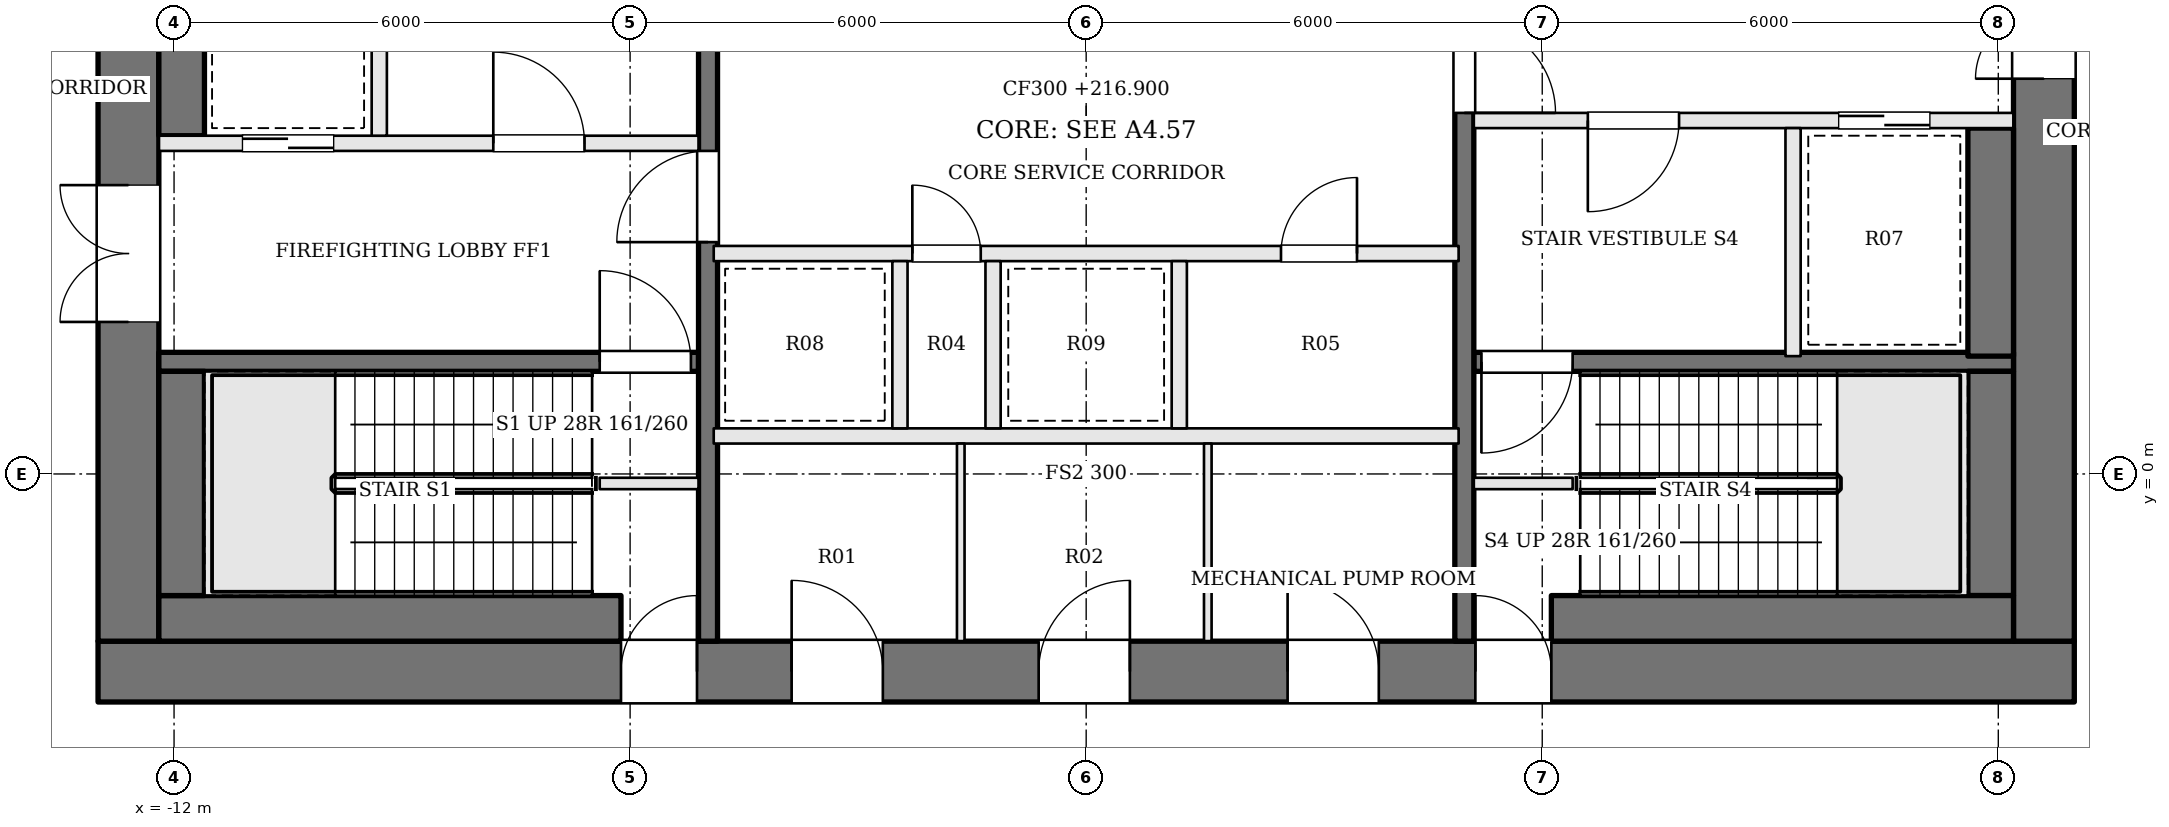
"""IFC4 building model, lengths in metres.
Left out: names, types, materials, properties, quantities, classifications, styles, units other than length and angle.
Written with IfcOpenShell. Run it as: python <this file> out.ifc"""

import sys

from ifc_helpers import new_model, si_unit, direction, frame, frame_2d, origin, place, context, subcontext, project, spatial, rectangle, extrude, element, fill, save


model = new_model("IFC4")
c1 = context("Model", 3, precision=1e-05, world=origin(), true_north=direction((0.0, 1.0)))
c2 = subcontext(c1, "Body", "Model", "MODEL_VIEW")
j1 = project(units=[si_unit("LENGTHUNIT", "METRE"), si_unit("PLANEANGLEUNIT", "RADIAN")], contexts=[c1])
p1 = place(None, origin())
s1 = spatial("IfcSite", under=j1, at=p1, CompositionType="ELEMENT")
p2 = place(p1, origin())
s2 = spatial("IfcBuilding", under=s1, at=p2, CompositionType="ELEMENT")
p3 = place(p2, frame((0.0, 0.0, 216.9)))
s3 = spatial("IfcBuildingStorey", under=s2, at=p3, CompositionType="ELEMENT", Elevation=216.9)
p4 = place(p3, frame((-13.0, -2.6, 0.0), z_axis=(0.0, 0.0, 1.0), x_axis=(1.0, 0.0, 0.0)))
e1 = element("IfcWall", 1, at=p4, inside=s3, PredefinedType="SHEAR", context=c2, shape_type="SweptSolid", body=[
    extrude(rectangle(XDim=26.0, YDim=0.8, at=frame_2d((13.0, 0.0))), origin(), (0.0, 0.0, 1.0), 4.5),
])
p5 = place(p4, frame((9.125, 0.0, 0.0)))
e2 = element("IfcOpeningElement", 2, at=p5, cuts=e1, PredefinedType="OPENING", context=c2, shape_type="SweptSolid", body=[
    extrude(rectangle(XDim=1.2, YDim=2.1, at=frame_2d((0.6, 1.05))), frame((0.0, 0.41, 0.0), z_axis=(0.0, -1.0, 0.0), x_axis=(1.0, 0.0, 0.0)), (0.0, 0.0, 1.0), 0.82),
])
p6 = place(p4, frame((12.375, 0.0, 0.0)))
e3 = element("IfcOpeningElement", 3, at=p6, cuts=e1, PredefinedType="OPENING", context=c2, shape_type="SweptSolid", body=[
    extrude(rectangle(XDim=1.2, YDim=2.1, at=frame_2d((0.6, 1.05))), frame((0.0, 0.41, 0.0), z_axis=(0.0, -1.0, 0.0), x_axis=(1.0, 0.0, 0.0)), (0.0, 0.0, 1.0), 0.82),
])
p7 = place(p4, frame((15.65, 0.0, 0.0)))
e4 = element("IfcOpeningElement", 4, at=p7, cuts=e1, PredefinedType="OPENING", context=c2, shape_type="SweptSolid", body=[
    extrude(rectangle(XDim=1.2, YDim=2.1, at=frame_2d((0.6, 1.05))), frame((0.0, 0.41, 0.0), z_axis=(0.0, -1.0, 0.0), x_axis=(1.0, 0.0, 0.0)), (0.0, 0.0, 1.0), 0.82),
])
p8 = place(p4, frame((6.88, 0.0, 0.0)))
e5 = element("IfcOpeningElement", 5, at=p8, cuts=e1, PredefinedType="OPENING", context=c2, shape_type="SweptSolid", body=[
    extrude(rectangle(XDim=1.0, YDim=2.1, at=frame_2d((0.5, 1.05))), frame((0.0, 0.41, 0.0), z_axis=(0.0, -1.0, 0.0), x_axis=(1.0, 0.0, 0.0)), (0.0, 0.0, 1.0), 0.82),
])
p9 = place(p4, frame((18.12, 0.0, 0.0)))
e6 = element("IfcOpeningElement", 6, at=p9, cuts=e1, PredefinedType="OPENING", context=c2, shape_type="SweptSolid", body=[
    extrude(rectangle(XDim=1.0, YDim=2.1, at=frame_2d((0.5, 1.05))), frame((0.0, 0.41, 0.0), z_axis=(0.0, -1.0, 0.0), x_axis=(1.0, 0.0, 0.0)), (0.0, 0.0, 1.0), 0.82),
])
p10 = place(p3, frame((12.6, -2.2, 0.0), z_axis=(0.0, 0.0, 1.0), x_axis=(0.0, 1.0, 0.0)))
e7 = element("IfcWall", 7, at=p10, inside=s3, PredefinedType="SHEAR", context=c2, shape_type="SweptSolid", body=[
    extrude(rectangle(XDim=13.4, YDim=0.8, at=frame_2d((6.7, 0.0))), origin(), (0.0, 0.0, 1.0), 4.5),
])
p11 = place(p10, frame((7.4, 0.0, 0.0)))
e8 = element("IfcOpeningElement", 8, at=p11, cuts=e7, PredefinedType="OPENING", context=c2, shape_type="SweptSolid", body=[
    extrude(rectangle(XDim=1.8, YDim=2.1, at=frame_2d((0.9, 1.05))), frame((0.0, 0.41, 0.0), z_axis=(0.0, -1.0, 0.0), x_axis=(1.0, 0.0, 0.0)), (0.0, 0.0, 1.0), 0.82),
])
p12 = place(p3, frame((-12.6, -2.2, 0.0), z_axis=(0.0, 0.0, 1.0), x_axis=(0.0, 1.0, 0.0)))
e9 = element("IfcWall", 9, at=p12, inside=s3, PredefinedType="SHEAR", context=c2, shape_type="SweptSolid", body=[
    extrude(rectangle(XDim=13.4, YDim=0.8, at=frame_2d((6.7, 0.0))), origin(), (0.0, 0.0, 1.0), 4.5),
])
p13 = place(p12, frame((4.2, 0.0, 0.0)))
e10 = element("IfcOpeningElement", 10, at=p13, cuts=e9, PredefinedType="OPENING", context=c2, shape_type="SweptSolid", body=[
    extrude(rectangle(XDim=1.8, YDim=2.1, at=frame_2d((0.9, 1.05))), frame((0.0, 0.41, 0.0), z_axis=(0.0, -1.0, 0.0), x_axis=(1.0, 0.0, 0.0)), (0.0, 0.0, 1.0), 0.82),
])
for number, where, z_axis, x_axis in (
    (11, (-6.4, -0.125, 0.0), (0.0, 0.0, 1.0), (1.0, 0.0, 0.0)),
    (12, (6.4, -0.125, 0.0), (0.0, 0.0, 1.0), (-1.0, 0.0, 0.0)),
):
    element("IfcWall", number, at=place(p3, frame(where, z_axis=z_axis, x_axis=x_axis)), inside=s3, PredefinedType="SOLIDWALL", context=c2, shape_type="SweptSolid", body=[
        extrude(rectangle(XDim=1.3, YDim=0.15, at=frame_2d((0.65, 0.0))), origin(), (0.0, 0.0, 1.0), 4.3),
    ])
p14 = place(p3, frame((-12.2, 1.475, 0.0), z_axis=(0.0, 0.0, 1.0), x_axis=(1.0, 0.0, 0.0)))
e13 = element("IfcWall", 13, at=p14, inside=s3, PredefinedType="SOLIDWALL", context=c2, shape_type="SweptSolid", body=[
    extrude(rectangle(XDim=7.1, YDim=0.25, at=frame_2d((3.55, 0.0))), origin(), (0.0, 0.0, 1.0), 4.3),
])
p15 = place(p14, frame((5.8, 0.0, 0.0)))
e14 = element("IfcOpeningElement", 14, at=p15, cuts=e13, PredefinedType="OPENING", context=c2, shape_type="SweptSolid", body=[
    extrude(rectangle(XDim=1.2, YDim=2.1, at=frame_2d((0.6, 1.05))), frame((0.0, 0.135, 0.0), z_axis=(0.0, -1.0, 0.0), x_axis=(1.0, 0.0, 0.0)), (0.0, 0.0, 1.0), 0.27),
])
p16 = place(p3, frame((-12.2, 4.35, 0.0), z_axis=(0.0, 0.0, 1.0), x_axis=(1.0, 0.0, 0.0)))
e15 = element("IfcWall", 15, at=p16, inside=s3, PredefinedType="SOLIDWALL", context=c2, shape_type="SweptSolid", body=[
    extrude(rectangle(XDim=7.1, YDim=0.2, at=frame_2d((3.55, 0.0))), origin(), (0.0, 0.0, 1.0), 4.3),
])
p17 = place(p16, frame((4.4, 0.0, 0.0)))
e16 = element("IfcOpeningElement", 16, at=p17, cuts=e15, PredefinedType="OPENING", context=c2, shape_type="SweptSolid", body=[
    extrude(rectangle(XDim=1.2, YDim=2.1, at=frame_2d((0.6, 1.05))), frame((0.0, 0.11, 0.0), z_axis=(0.0, -1.0, 0.0), x_axis=(1.0, 0.0, 0.0)), (0.0, 0.0, 1.0), 0.22),
])
p18 = place(p16, frame((1.1, 0.0, 0.0)))
e17 = element("IfcOpeningElement", 17, at=p18, cuts=e15, PredefinedType="OPENING", context=c2, shape_type="SweptSolid", body=[
    extrude(rectangle(XDim=1.2, YDim=2.1, at=frame_2d((0.6, 1.05))), frame((0.0, 0.11, 0.0), z_axis=(0.0, -1.0, 0.0), x_axis=(1.0, 0.0, 0.0)), (0.0, 0.0, 1.0), 0.22),
])
p19 = place(p3, frame((12.2, 4.65, 0.0), z_axis=(0.0, 0.0, 1.0), x_axis=(-1.0, 0.0, 0.0)))
e18 = element("IfcWall", 18, at=p19, inside=s3, PredefinedType="SOLIDWALL", context=c2, shape_type="SweptSolid", body=[
    extrude(rectangle(XDim=7.1, YDim=0.2, at=frame_2d((3.55, 0.0))), origin(), (0.0, 0.0, 1.0), 4.3),
])
p20 = place(p19, frame((4.4, 0.0, 0.0)))
e19 = element("IfcOpeningElement", 19, at=p20, cuts=e18, PredefinedType="OPENING", context=c2, shape_type="SweptSolid", body=[
    extrude(rectangle(XDim=1.2, YDim=2.1, at=frame_2d((0.6, 1.05))), frame((0.0, 0.11, 0.0), z_axis=(0.0, -1.0, 0.0), x_axis=(1.0, 0.0, 0.0)), (0.0, 0.0, 1.0), 0.22),
])
p21 = place(p19, frame((1.1, 0.0, 0.0)))
e20 = element("IfcOpeningElement", 20, at=p21, cuts=e18, PredefinedType="OPENING", context=c2, shape_type="SweptSolid", body=[
    extrude(rectangle(XDim=1.2, YDim=2.1, at=frame_2d((0.6, 1.05))), frame((0.0, 0.11, 0.0), z_axis=(0.0, -1.0, 0.0), x_axis=(1.0, 0.0, 0.0)), (0.0, 0.0, 1.0), 0.22),
])
p22 = place(p3, frame((12.2, 1.475, 0.0), z_axis=(0.0, 0.0, 1.0), x_axis=(-1.0, 0.0, 0.0)))
e21 = element("IfcWall", 21, at=p22, inside=s3, PredefinedType="SOLIDWALL", context=c2, shape_type="SweptSolid", body=[
    extrude(rectangle(XDim=7.1, YDim=0.25, at=frame_2d((3.55, 0.0))), origin(), (0.0, 0.0, 1.0), 4.3),
])
p23 = place(p22, frame((5.8, 0.0, 0.0)))
e22 = element("IfcOpeningElement", 22, at=p23, cuts=e21, PredefinedType="OPENING", context=c2, shape_type="SweptSolid", body=[
    extrude(rectangle(XDim=1.2, YDim=2.1, at=frame_2d((0.6, 1.05))), frame((0.0, 0.135, 0.0), z_axis=(0.0, -1.0, 0.0), x_axis=(1.0, 0.0, 0.0)), (0.0, 0.0, 1.0), 0.27),
])
for number, where, z_axis, x_axis in (
    (23, (-9.3, 4.45, 0.0), (0.0, 0.0, 1.0), (0.0, 1.0, 0.0)),
    (24, (9.3, 4.55, 0.0), (0.0, 0.0, 1.0), (0.0, -1.0, 0.0)),
):
    element("IfcWall", number, at=place(p3, frame(where, z_axis=z_axis, x_axis=x_axis)), inside=s3, PredefinedType="SOLIDWALL", context=c2, shape_type="SweptSolid", body=[
        extrude(rectangle(XDim=3.0, YDim=0.2, at=frame_2d((1.5, 0.0))), origin(), (0.0, 0.0, 1.0), 4.3),
    ])
p24 = place(p3, frame((-4.975, -2.2, 0.0), z_axis=(0.0, 0.0, 1.0), x_axis=(0.0, 1.0, 0.0)))
e25 = element("IfcWall", 25, at=p24, inside=s3, PredefinedType="SOLIDWALL", context=c2, shape_type="SweptSolid", body=[
    extrude(rectangle(XDim=13.4, YDim=0.25, at=frame_2d((6.7, 0.0))), origin(), (0.0, 0.0, 1.0), 4.3),
])
p25 = place(p24, frame((5.25, 0.0, 0.0)))
e26 = element("IfcOpeningElement", 26, at=p25, cuts=e25, PredefinedType="OPENING", context=c2, shape_type="SweptSolid", body=[
    extrude(rectangle(XDim=1.2, YDim=2.1, at=frame_2d((0.6, 1.05))), frame((0.0, 0.135, 0.0), z_axis=(0.0, -1.0, 0.0), x_axis=(1.0, 0.0, 0.0)), (0.0, 0.0, 1.0), 0.27),
])
p26 = place(p3, frame((4.975, 11.2, 0.0), z_axis=(0.0, 0.0, 1.0), x_axis=(0.0, -1.0, 0.0)))
e27 = element("IfcWall", 27, at=p26, inside=s3, PredefinedType="SOLIDWALL", context=c2, shape_type="SweptSolid", body=[
    extrude(rectangle(XDim=13.4, YDim=0.25, at=frame_2d((6.7, 0.0))), origin(), (0.0, 0.0, 1.0), 4.3),
])
p27 = place(p26, frame((5.25, 0.0, 0.0)))
e28 = element("IfcOpeningElement", 28, at=p27, cuts=e27, PredefinedType="OPENING", context=c2, shape_type="SweptSolid", body=[
    extrude(rectangle(XDim=1.2, YDim=2.1, at=frame_2d((0.6, 1.05))), frame((0.0, 0.135, 0.0), z_axis=(0.0, -1.0, 0.0), x_axis=(1.0, 0.0, 0.0)), (0.0, 0.0, 1.0), 0.27),
])
p28 = place(p3, frame((-12.2, -1.9, 0.0), z_axis=(0.0, 0.0, 1.0), x_axis=(1.0, 0.0, 0.0)))
e29 = element("IfcWall", 29, at=p28, inside=s3, PredefinedType="SOLIDWALL", context=c2, shape_type="SweptSolid", body=[
    extrude(rectangle(XDim=6.08, YDim=0.6, at=frame_2d((3.04, 0.0))), origin(), (0.0, 0.0, 1.0), 4.3),
])
p29 = place(p3, frame((-11.9, -1.6, 0.0), z_axis=(0.0, 0.0, 1.0), x_axis=(0.0, 1.0, 0.0)))
e30 = element("IfcWall", 30, at=p29, inside=s3, PredefinedType="SOLIDWALL", context=c2, shape_type="SweptSolid", body=[
    extrude(rectangle(XDim=2.95, YDim=0.6, at=frame_2d((1.475, 0.0))), origin(), (0.0, 0.0, 1.0), 4.3),
])
for number, where, z_axis, x_axis in (
    (31, (-11.9, 4.45, 0.0), (0.0, 0.0, 1.0), (0.0, 1.0, 0.0)),
    (32, (11.9, 4.55, 0.0), (0.0, 0.0, 1.0), (0.0, -1.0, 0.0)),
):
    element("IfcWall", number, at=place(p3, frame(where, z_axis=z_axis, x_axis=x_axis)), inside=s3, PredefinedType="SOLIDWALL", context=c2, shape_type="SweptSolid", body=[
        extrude(rectangle(XDim=3.0, YDim=0.6, at=frame_2d((1.5, 0.0))), origin(), (0.0, 0.0, 1.0), 4.3),
    ])
p30 = place(p3, frame((11.9, 1.35, 0.0), z_axis=(0.0, 0.0, 1.0), x_axis=(0.0, -1.0, 0.0)))
e33 = element("IfcWall", 33, at=p30, inside=s3, PredefinedType="SOLIDWALL", context=c2, shape_type="SweptSolid", body=[
    extrude(rectangle(XDim=2.95, YDim=0.6, at=frame_2d((1.475, 0.0))), origin(), (0.0, 0.0, 1.0), 4.3),
])
p31 = place(p3, frame((12.2, -1.9, 0.0), z_axis=(0.0, 0.0, 1.0), x_axis=(-1.0, 0.0, 0.0)))
e34 = element("IfcWall", 34, at=p31, inside=s3, PredefinedType="SOLIDWALL", context=c2, shape_type="SweptSolid", body=[
    extrude(rectangle(XDim=6.08, YDim=0.6, at=frame_2d((3.04, 0.0))), origin(), (0.0, 0.0, 1.0), 4.3),
])
p32 = place(p3, frame((-4.9, 0.5, 0.0), z_axis=(0.0, 0.0, 1.0), x_axis=(1.0, 0.0, 0.0)))
e35 = element("IfcWall", 35, at=p32, inside=s3, PredefinedType="SOLIDWALL", context=c2, shape_type="SweptSolid", body=[
    extrude(rectangle(XDim=9.8, YDim=0.2, at=frame_2d((4.9, 0.0))), origin(), (0.0, 0.0, 1.0), 4.3),
])
p33 = place(p3, frame((-4.9, 2.9, 0.0), z_axis=(0.0, 0.0, 1.0), x_axis=(1.0, 0.0, 0.0)))
e36 = element("IfcWall", 36, at=p33, inside=s3, PredefinedType="SOLIDWALL", context=c2, shape_type="SweptSolid", body=[
    extrude(rectangle(XDim=9.8, YDim=0.2, at=frame_2d((4.9, 0.0))), origin(), (0.0, 0.0, 1.0), 4.3),
])
p34 = place(p33, frame((2.613, 0.0, 0.0)))
e37 = element("IfcOpeningElement", 37, at=p34, cuts=e36, PredefinedType="OPENING", context=c2, shape_type="SweptSolid", body=[
    extrude(rectangle(XDim=0.9, YDim=2.1, at=frame_2d((0.45, 1.05))), frame((0.0, 0.11, 0.0), z_axis=(0.0, -1.0, 0.0), x_axis=(1.0, 0.0, 0.0)), (0.0, 0.0, 1.0), 0.22),
])
p35 = place(p33, frame((7.463, 0.0, 0.0)))
e38 = element("IfcOpeningElement", 38, at=p35, cuts=e36, PredefinedType="OPENING", context=c2, shape_type="SweptSolid", body=[
    extrude(rectangle(XDim=1.0, YDim=2.1, at=frame_2d((0.5, 1.05))), frame((0.0, 0.11, 0.0), z_axis=(0.0, -1.0, 0.0), x_axis=(1.0, 0.0, 0.0)), (0.0, 0.0, 1.0), 0.22),
])
for number, where, z_axis, x_axis in (
    (39, (-2.45, 0.6, 0.0), (0.0, 0.0, 1.0), (0.0, 1.0, 0.0)),
    (40, (-1.225, 0.6, 0.0), (0.0, 0.0, 1.0), (0.0, 1.0, 0.0)),
    (41, (1.225, 0.6, 0.0), (0.0, 0.0, 1.0), (0.0, 1.0, 0.0)),
):
    element("IfcWall", number, at=place(p3, frame(where, z_axis=z_axis, x_axis=x_axis)), inside=s3, PredefinedType="SOLIDWALL", context=c2, shape_type="SweptSolid", body=[
        extrude(rectangle(XDim=2.2, YDim=0.2, at=frame_2d((1.1, 0.0))), origin(), (0.0, 0.0, 1.0), 4.3),
    ])
for number, where, z_axis, x_axis in (
    (42, (-1.65, -2.2, 0.0), (0.0, 0.0, 1.0), (0.0, 1.0, 0.0)),
    (43, (1.6, -2.2, 0.0), (0.0, 0.0, 1.0), (0.0, 1.0, 0.0)),
):
    element("IfcWall", number, at=place(p3, frame(where, z_axis=z_axis, x_axis=x_axis)), inside=s3, PredefinedType="PARTITIONING", context=c2, shape_type="SweptSolid", body=[
        extrude(rectangle(XDim=2.6, YDim=0.1, at=frame_2d((1.3, 0.0))), origin(), (0.0, 0.0, 1.0), 4.3),
    ])
p36 = place(p13, origin())
e44 = element("IfcDoor", 44, at=p36, inside=s3, OperationType="DOUBLE_DOOR_SINGLE_SWING", PredefinedType="DOOR", context=c2, shape_type="SweptSolid", body=[
    extrude(rectangle(XDim=1.8, YDim=2.1, at=frame_2d((0.9, 1.05))), frame((0.0, 0.025, 0.0), z_axis=(0.0, -1.0, 0.0), x_axis=(1.0, 0.0, 0.0)), (0.0, 0.0, 1.0), 0.05),
])
fill(e10, e44)
p37 = place(p11, origin())
e45 = element("IfcDoor", 45, at=p37, inside=s3, OperationType="DOUBLE_DOOR_SINGLE_SWING", PredefinedType="DOOR", context=c2, shape_type="SweptSolid", body=[
    extrude(rectangle(XDim=1.8, YDim=2.1, at=frame_2d((0.9, 1.05))), frame((0.0, 0.025, 0.0), z_axis=(0.0, -1.0, 0.0), x_axis=(1.0, 0.0, 0.0)), (0.0, 0.0, 1.0), 0.05),
])
fill(e8, e45)
p38 = place(p25, origin())
e46 = element("IfcDoor", 46, at=p38, inside=s3, OperationType="SINGLE_SWING_LEFT", PredefinedType="DOOR", context=c2, shape_type="SweptSolid", body=[
    extrude(rectangle(XDim=1.2, YDim=2.1, at=frame_2d((0.6, 1.05))), frame((0.0, 0.025, 0.0), z_axis=(0.0, -1.0, 0.0), x_axis=(1.0, 0.0, 0.0)), (0.0, 0.0, 1.0), 0.05),
])
fill(e26, e46)
p39 = place(p27, origin())
e47 = element("IfcDoor", 47, at=p39, inside=s3, OperationType="SINGLE_SWING_RIGHT", PredefinedType="DOOR", context=c2, shape_type="SweptSolid", body=[
    extrude(rectangle(XDim=1.2, YDim=2.1, at=frame_2d((0.6, 1.05))), frame((0.0, 0.025, 0.0), z_axis=(0.0, -1.0, 0.0), x_axis=(1.0, 0.0, 0.0)), (0.0, 0.0, 1.0), 0.05),
])
fill(e28, e47)
p40 = place(p17, origin())
e48 = element("IfcDoor", 48, at=p40, inside=s3, OperationType="SINGLE_SWING_LEFT", PredefinedType="DOOR", context=c2, shape_type="SweptSolid", body=[
    extrude(rectangle(XDim=1.2, YDim=2.1, at=frame_2d((0.6, 1.05))), frame((0.0, 0.025, 0.0), z_axis=(0.0, -1.0, 0.0), x_axis=(1.0, 0.0, 0.0)), (0.0, 0.0, 1.0), 0.05),
])
fill(e16, e48)
p41 = place(p20, origin())
e49 = element("IfcDoor", 49, at=p41, inside=s3, OperationType="SINGLE_SWING_RIGHT", PredefinedType="DOOR", context=c2, shape_type="SweptSolid", body=[
    extrude(rectangle(XDim=1.2, YDim=2.1, at=frame_2d((0.6, 1.05))), frame((0.0, 0.025, 0.0), z_axis=(0.0, -1.0, 0.0), x_axis=(1.0, 0.0, 0.0)), (0.0, 0.0, 1.0), 0.05),
])
fill(e19, e49)
p42 = place(p15, origin())
e50 = element("IfcDoor", 50, at=p42, inside=s3, OperationType="SINGLE_SWING_LEFT", PredefinedType="DOOR", context=c2, shape_type="SweptSolid", body=[
    extrude(rectangle(XDim=1.2, YDim=2.1, at=frame_2d((0.6, 1.05))), frame((0.0, 0.025, 0.0), z_axis=(0.0, -1.0, 0.0), x_axis=(1.0, 0.0, 0.0)), (0.0, 0.0, 1.0), 0.05),
])
fill(e14, e50)
p43 = place(p23, origin())
e51 = element("IfcDoor", 51, at=p43, inside=s3, OperationType="SINGLE_SWING_RIGHT", PredefinedType="DOOR", context=c2, shape_type="SweptSolid", body=[
    extrude(rectangle(XDim=1.2, YDim=2.1, at=frame_2d((0.6, 1.05))), frame((0.0, 0.025, 0.0), z_axis=(0.0, -1.0, 0.0), x_axis=(1.0, 0.0, 0.0)), (0.0, 0.0, 1.0), 0.05),
])
fill(e22, e51)
p44 = place(p18, origin())
e52 = element("IfcDoor", 52, at=p44, inside=s3, OperationType="SLIDING_TO_RIGHT", PredefinedType="DOOR", context=c2, shape_type="SweptSolid", body=[
    extrude(rectangle(XDim=1.2, YDim=2.1, at=frame_2d((0.6, 1.05))), frame((0.0, 0.025, 0.0), z_axis=(0.0, -1.0, 0.0), x_axis=(1.0, 0.0, 0.0)), (0.0, 0.0, 1.0), 0.05),
])
fill(e17, e52)
p45 = place(p21, origin())
e53 = element("IfcDoor", 53, at=p45, inside=s3, OperationType="SLIDING_TO_RIGHT", PredefinedType="DOOR", context=c2, shape_type="SweptSolid", body=[
    extrude(rectangle(XDim=1.2, YDim=2.1, at=frame_2d((0.6, 1.05))), frame((0.0, 0.025, 0.0), z_axis=(0.0, -1.0, 0.0), x_axis=(1.0, 0.0, 0.0)), (0.0, 0.0, 1.0), 0.05),
])
fill(e20, e53)
p46 = place(p34, origin())
e54 = element("IfcDoor", 54, at=p46, inside=s3, OperationType="SINGLE_SWING_LEFT", PredefinedType="DOOR", context=c2, shape_type="SweptSolid", body=[
    extrude(rectangle(XDim=0.9, YDim=2.1, at=frame_2d((0.45, 1.05))), frame((0.0, 0.025, 0.0), z_axis=(0.0, -1.0, 0.0), x_axis=(1.0, 0.0, 0.0)), (0.0, 0.0, 1.0), 0.05),
])
fill(e37, e54)
p47 = place(p35, origin())
e55 = element("IfcDoor", 55, at=p47, inside=s3, OperationType="SINGLE_SWING_RIGHT", PredefinedType="DOOR", context=c2, shape_type="SweptSolid", body=[
    extrude(rectangle(XDim=1.0, YDim=2.1, at=frame_2d((0.5, 1.05))), frame((0.0, 0.025, 0.0), z_axis=(0.0, -1.0, 0.0), x_axis=(1.0, 0.0, 0.0)), (0.0, 0.0, 1.0), 0.05),
])
fill(e38, e55)
p48 = place(p5, origin())
e56 = element("IfcDoor", 56, at=p48, inside=s3, OperationType="SINGLE_SWING_LEFT", PredefinedType="DOOR", context=c2, shape_type="SweptSolid", body=[
    extrude(rectangle(XDim=1.2, YDim=2.1, at=frame_2d((0.6, 1.05))), frame((0.0, 0.025, 0.0), z_axis=(0.0, -1.0, 0.0), x_axis=(1.0, 0.0, 0.0)), (0.0, 0.0, 1.0), 0.05),
])
fill(e2, e56)
p49 = place(p6, origin())
e57 = element("IfcDoor", 57, at=p49, inside=s3, OperationType="SINGLE_SWING_RIGHT", PredefinedType="DOOR", context=c2, shape_type="SweptSolid", body=[
    extrude(rectangle(XDim=1.2, YDim=2.1, at=frame_2d((0.6, 1.05))), frame((0.0, 0.025, 0.0), z_axis=(0.0, -1.0, 0.0), x_axis=(1.0, 0.0, 0.0)), (0.0, 0.0, 1.0), 0.05),
])
fill(e3, e57)
p50 = place(p7, origin())
e58 = element("IfcDoor", 58, at=p50, inside=s3, OperationType="SINGLE_SWING_LEFT", PredefinedType="DOOR", context=c2, shape_type="SweptSolid", body=[
    extrude(rectangle(XDim=1.2, YDim=2.1, at=frame_2d((0.6, 1.05))), frame((0.0, 0.025, 0.0), z_axis=(0.0, -1.0, 0.0), x_axis=(1.0, 0.0, 0.0)), (0.0, 0.0, 1.0), 0.05),
])
fill(e4, e58)
p51 = place(p8, origin())
e59 = element("IfcDoor", 59, at=p51, inside=s3, OperationType="SINGLE_SWING_RIGHT", PredefinedType="DOOR", context=c2, shape_type="SweptSolid", body=[
    extrude(rectangle(XDim=1.0, YDim=2.1, at=frame_2d((0.5, 1.05))), frame((0.0, 0.025, 0.0), z_axis=(0.0, -1.0, 0.0), x_axis=(1.0, 0.0, 0.0)), (0.0, 0.0, 1.0), 0.05),
])
fill(e5, e59)
p52 = place(p9, origin())
e60 = element("IfcDoor", 60, at=p52, inside=s3, OperationType="SINGLE_SWING_LEFT", PredefinedType="DOOR", context=c2, shape_type="SweptSolid", body=[
    extrude(rectangle(XDim=1.0, YDim=2.1, at=frame_2d((0.5, 1.05))), frame((0.0, 0.025, 0.0), z_axis=(0.0, -1.0, 0.0), x_axis=(1.0, 0.0, 0.0)), (0.0, 0.0, 1.0), 0.05),
])
fill(e6, e60)
save(model, sys.argv[1])
